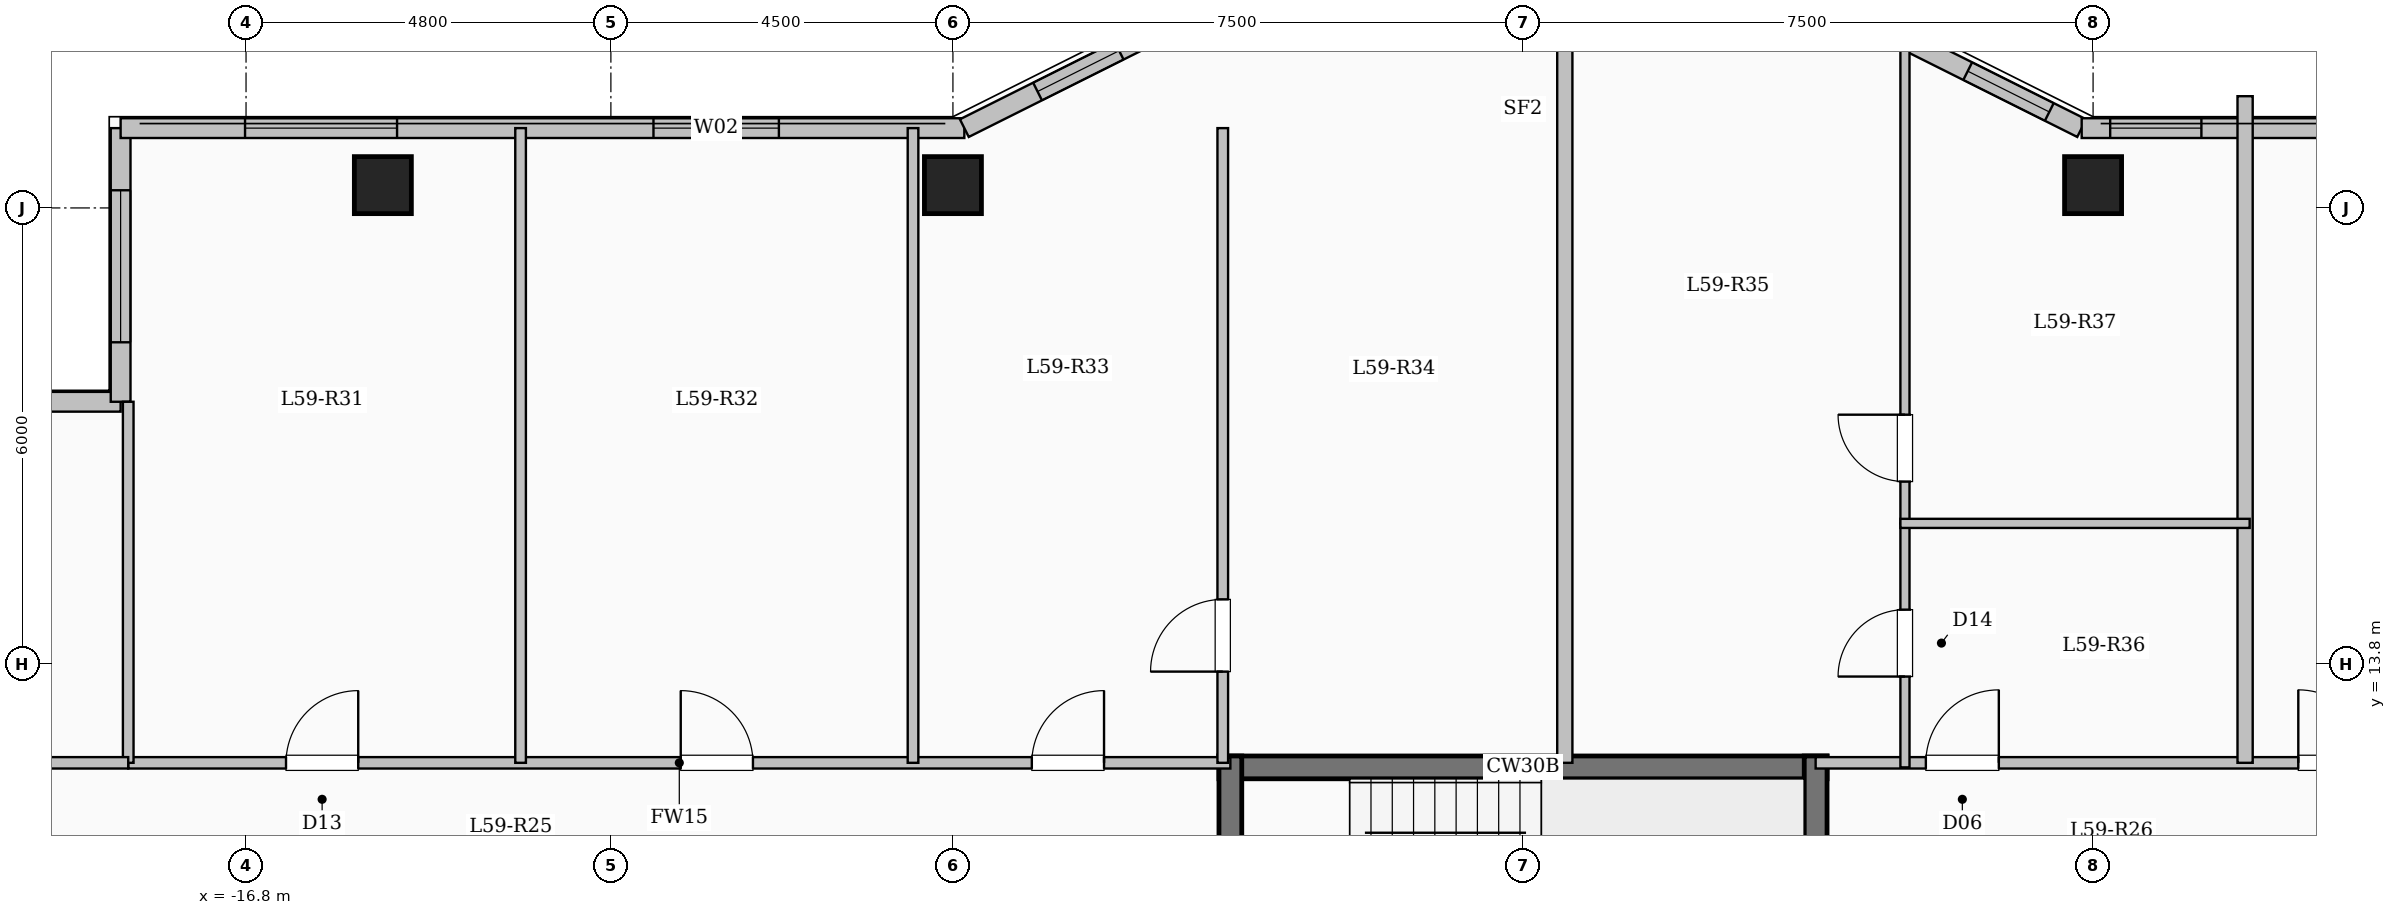
"""IFC4 building model, lengths in metres.
Left out: names, types, materials, properties, quantities, classifications, styles, units other than length and angle.
Written with IfcOpenShell. Run it as: python <this file> out.ifc"""

import sys

from ifc_helpers import new_model, si_unit, direction, frame, frame_2d, origin, origin_2d, place, context, subcontext, project, spatial, rectangle, extrude, element, fill, save


model = new_model("IFC4")
c1 = context("Model", 3, precision=1e-05, world=origin(), true_north=direction((0.0, 1.0)))
c2 = subcontext(c1, "Body", "Model", "MODEL_VIEW")
j1 = project(units=[si_unit("LENGTHUNIT", "METRE"), si_unit("PLANEANGLEUNIT", "RADIAN")], contexts=[c1])
p1 = place(None, origin())
s1 = spatial("IfcSite", under=j1, at=p1, CompositionType="ELEMENT")
p2 = place(p1, origin())
s2 = spatial("IfcBuilding", under=s1, at=p2, CompositionType="ELEMENT")
p3 = place(p2, frame((0.0, 0.0, 217.05)))
s3 = spatial("IfcBuildingStorey", under=s2, at=p3, CompositionType="ELEMENT", Elevation=217.05)
for number, where, z_axis, x_axis in (
    (1, (-15.0, 20.1, 0.0), (0.0, 0.0, 1.0), (1.0, 0.0, 0.0)),
    (2, (-7.5, 20.1, 0.0), (0.0, 0.0, 1.0), (1.0, 0.0, 0.0)),
    (3, (7.5, 20.1, 0.0), (0.0, 0.0, 1.0), (1.0, 0.0, 0.0)),
):
    element("IfcColumn", number, at=place(p3, frame(where, z_axis=z_axis, x_axis=x_axis)), inside=s3, PredefinedType="COLUMN", context=c2, shape_type="SweptSolid", body=[
        extrude(rectangle(XDim=0.75, YDim=0.75, at=origin_2d()), origin(), (0.0, 0.0, 1.0), 3.35),
    ])
p4 = place(p3, frame((-23.55, 17.25, 0.0), z_axis=(0.0, 0.0, 1.0), x_axis=(1.0, 0.0, 0.0)))
e4 = element("IfcWall", 4, at=p4, inside=s3, PredefinedType="SOLIDWALL", context=c2, shape_type="SweptSolid", body=[
    extrude(rectangle(XDim=5.1, YDim=0.26, at=frame_2d((2.55, 0.0))), origin(), (0.0, 0.0, 1.0), 3.1),
])
p5 = place(p4, frame((1.575, 0.0, 0.9)))
e5 = element("IfcOpeningElement", 5, at=p5, cuts=e4, PredefinedType="OPENING", context=c2, shape_type="SweptSolid", body=[
    extrude(rectangle(XDim=2.0, YDim=1.7, at=frame_2d((1.0, 0.85))), frame((0.0, 0.14, 0.0), z_axis=(0.0, -1.0, 0.0), x_axis=(1.0, 0.0, 0.0)), (0.0, 0.0, 1.0), 0.28),
])
p6 = place(p3, frame((-18.45, 17.25, 0.0), z_axis=(0.0, 0.0, 1.0), x_axis=(0.0, 1.0, 0.0)))
e6 = element("IfcWall", 6, at=p6, inside=s3, PredefinedType="SOLIDWALL", context=c2, shape_type="SweptSolid", body=[
    extrude(rectangle(XDim=3.6, YDim=0.26, at=frame_2d((1.8, 0.0))), origin(), (0.0, 0.0, 1.0), 3.1),
])
p7 = place(p6, frame((0.782, 0.0, 0.9)))
e7 = element("IfcOpeningElement", 7, at=p7, cuts=e6, PredefinedType="OPENING", context=c2, shape_type="SweptSolid", body=[
    extrude(rectangle(XDim=2.0, YDim=1.7, at=frame_2d((1.0, 0.85))), frame((0.0, 0.14, 0.0), z_axis=(0.0, -1.0, 0.0), x_axis=(1.0, 0.0, 0.0)), (0.0, 0.0, 1.0), 0.28),
])
p8 = place(p3, frame((-18.45, 20.85, 0.0), z_axis=(0.0, 0.0, 1.0), x_axis=(1.0, 0.0, 0.0)))
e8 = element("IfcWall", 8, at=p8, inside=s3, PredefinedType="SOLIDWALL", context=c2, shape_type="SweptSolid", body=[
    extrude(rectangle(XDim=11.1, YDim=0.26, at=frame_2d((5.55, 0.0))), origin(), (0.0, 0.0, 1.0), 3.1),
])
p9 = place(p8, frame((1.637, 0.0, 0.9)))
e9 = element("IfcOpeningElement", 9, at=p9, cuts=e8, PredefinedType="OPENING", context=c2, shape_type="SweptSolid", body=[
    extrude(rectangle(XDim=2.0, YDim=1.7, at=frame_2d((1.0, 0.85))), frame((0.0, 0.14, 0.0), z_axis=(0.0, -1.0, 0.0), x_axis=(1.0, 0.0, 0.0)), (0.0, 0.0, 1.0), 0.28),
])
p10 = place(p8, frame((7.01, 0.0, 0.9)))
e10 = element("IfcOpeningElement", 10, at=p10, cuts=e8, PredefinedType="OPENING", context=c2, shape_type="SweptSolid", body=[
    extrude(rectangle(XDim=1.65, YDim=1.6, at=frame_2d((0.825, 0.8))), frame((0.0, 0.14, 0.0), z_axis=(0.0, -1.0, 0.0), x_axis=(1.0, 0.0, 0.0)), (0.0, 0.0, 1.0), 0.28),
])
p11 = place(p3, frame((-7.35, 20.85, 0.0), z_axis=(0.0, 0.0, 1.0), x_axis=(0.894427191, 0.4472135955, 0.0)))
e11 = element("IfcWall", 11, at=p11, inside=s3, PredefinedType="SOLIDWALL", context=c2, shape_type="SweptSolid", body=[
    extrude(rectangle(XDim=3.354, YDim=0.26, at=frame_2d((1.677, 0.0))), origin(), (0.0, 0.0, 1.0), 3.1),
])
p12 = place(p11, frame((1.077, 0.0, 0.95)))
e12 = element("IfcOpeningElement", 12, at=p12, cuts=e11, PredefinedType="OPENING", context=c2, shape_type="SweptSolid", body=[
    extrude(rectangle(XDim=1.2, YDim=1.5, at=frame_2d((0.6, 0.75))), frame((0.0, 0.14, 0.0), z_axis=(0.0, -1.0, 0.0), x_axis=(1.0, 0.0, 0.0)), (0.0, 0.0, 1.0), 0.28),
])
p13 = place(p3, frame((4.35, 22.35, 0.0), z_axis=(0.0, 0.0, 1.0), x_axis=(0.894427191, -0.4472135955, 0.0)))
e13 = element("IfcWall", 13, at=p13, inside=s3, PredefinedType="SOLIDWALL", context=c2, shape_type="SweptSolid", body=[
    extrude(rectangle(XDim=3.354, YDim=0.26, at=frame_2d((1.677, 0.0))), origin(), (0.0, 0.0, 1.0), 3.1),
])
p14 = place(p13, frame((1.678, 0.0, 0.95)))
e14 = element("IfcOpeningElement", 14, at=p14, cuts=e13, PredefinedType="OPENING", context=c2, shape_type="SweptSolid", body=[
    extrude(rectangle(XDim=1.2, YDim=1.5, at=frame_2d((0.6, 0.75))), frame((0.0, 0.14, 0.0), z_axis=(0.0, -1.0, 0.0), x_axis=(1.0, 0.0, 0.0)), (0.0, 0.0, 1.0), 0.28),
])
p15 = place(p3, frame((7.35, 20.85, 0.0), z_axis=(0.0, 0.0, 1.0), x_axis=(1.0, 0.0, 0.0)))
e15 = element("IfcWall", 15, at=p15, inside=s3, PredefinedType="SOLIDWALL", context=c2, shape_type="SweptSolid", body=[
    extrude(rectangle(XDim=11.1, YDim=0.26, at=frame_2d((5.55, 0.0))), origin(), (0.0, 0.0, 1.0), 3.1),
])
p16 = place(p15, frame((0.375, 0.0, 0.95)))
e16 = element("IfcOpeningElement", 16, at=p16, cuts=e15, PredefinedType="OPENING", context=c2, shape_type="SweptSolid", body=[
    extrude(rectangle(XDim=1.2, YDim=1.5, at=frame_2d((0.6, 0.75))), frame((0.0, 0.14, 0.0), z_axis=(0.0, -1.0, 0.0), x_axis=(1.0, 0.0, 0.0)), (0.0, 0.0, 1.0), 0.28),
])
p17 = place(p15, frame((3.245, 0.0, 0.9)))
e17 = element("IfcOpeningElement", 17, at=p17, cuts=e15, PredefinedType="OPENING", context=c2, shape_type="SweptSolid", body=[
    extrude(rectangle(XDim=2.2, YDim=1.75, at=frame_2d((1.1, 0.875))), frame((0.0, 0.14, 0.0), z_axis=(0.0, -1.0, 0.0), x_axis=(1.0, 0.0, 0.0)), (0.0, 0.0, 1.0), 0.28),
])
p18 = place(p15, frame((7.965, 0.0, 0.9)))
e18 = element("IfcOpeningElement", 18, at=p18, cuts=e15, PredefinedType="OPENING", context=c2, shape_type="SweptSolid", body=[
    extrude(rectangle(XDim=1.65, YDim=1.6, at=frame_2d((0.825, 0.8))), frame((0.0, 0.14, 0.0), z_axis=(0.0, -1.0, 0.0), x_axis=(1.0, 0.0, 0.0)), (0.0, 0.0, 1.0), 0.28),
])
p19 = place(p3, frame((-4.0, 12.44, 0.0), z_axis=(0.0, 0.0, 1.0), x_axis=(1.0, 0.0, 0.0)))
e19 = element("IfcWall", 19, at=p19, inside=s3, PredefinedType="SHEAR", context=c2, shape_type="SweptSolid", body=[
    extrude(rectangle(XDim=8.0, YDim=0.3, at=frame_2d((4.0, 0.0))), origin(), (0.0, 0.0, 1.0), 3.35),
])
for number, where, z_axis, x_axis in (
    (20, (-3.85, 9.0, 0.0), (0.0, 0.0, 1.0), (0.0, 1.0, 0.0)),
    (21, (3.85, 9.0, 0.0), (0.0, 0.0, 1.0), (0.0, 1.0, 0.0)),
):
    element("IfcWall", number, at=place(p3, frame(where, z_axis=z_axis, x_axis=x_axis)), inside=s3, PredefinedType="SHEAR", context=c2, shape_type="SweptSolid", body=[
        extrude(rectangle(XDim=3.59, YDim=0.3, at=frame_2d((1.795, 0.0))), origin(), (0.0, 0.0, 1.0), 3.35),
    ])
p20 = place(p3, frame((-18.35, 12.5, 0.0), z_axis=(0.0, 0.0, 1.0), x_axis=(1.0, 0.0, 0.0)))
e22 = element("IfcWall", 22, at=p20, inside=s3, PredefinedType="PARTITIONING", context=c2, shape_type="SweptSolid", body=[
    extrude(rectangle(XDim=14.5, YDim=0.15, at=frame_2d((7.25, 0.0))), origin(), (0.0, 0.0, 1.0), 3.1),
])
p21 = place(p20, frame((2.076, 0.0, 0.0)))
e23 = element("IfcOpeningElement", 23, at=p21, cuts=e22, PredefinedType="OPENING", context=c2, shape_type="SweptSolid", body=[
    extrude(rectangle(XDim=0.95, YDim=2.15, at=frame_2d((0.475, 1.075))), frame((0.0, 0.085, 0.0), z_axis=(0.0, -1.0, 0.0), x_axis=(1.0, 0.0, 0.0)), (0.0, 0.0, 1.0), 0.17),
])
p22 = place(p20, frame((7.269, 0.0, 0.0)))
e24 = element("IfcOpeningElement", 24, at=p22, cuts=e22, PredefinedType="OPENING", context=c2, shape_type="SweptSolid", body=[
    extrude(rectangle(XDim=0.95, YDim=2.15, at=frame_2d((0.475, 1.075))), frame((0.0, 0.085, 0.0), z_axis=(0.0, -1.0, 0.0), x_axis=(1.0, 0.0, 0.0)), (0.0, 0.0, 1.0), 0.17),
])
p23 = place(p20, frame((11.888, 0.0, 0.0)))
e25 = element("IfcOpeningElement", 25, at=p23, cuts=e22, PredefinedType="OPENING", context=c2, shape_type="SweptSolid", body=[
    extrude(rectangle(XDim=0.95, YDim=2.15, at=frame_2d((0.475, 1.075))), frame((0.0, 0.085, 0.0), z_axis=(0.0, -1.0, 0.0), x_axis=(1.0, 0.0, 0.0)), (0.0, 0.0, 1.0), 0.17),
])
p24 = place(p3, frame((3.85, 12.5, 0.0), z_axis=(0.0, 0.0, 1.0), x_axis=(1.0, 0.0, 0.0)))
e26 = element("IfcWall", 26, at=p24, inside=s3, PredefinedType="PARTITIONING", context=c2, shape_type="SweptSolid", body=[
    extrude(rectangle(XDim=14.5, YDim=0.15, at=frame_2d((7.25, 0.0))), origin(), (0.0, 0.0, 1.0), 3.1),
])
p25 = place(p24, frame((1.45, 0.0, 0.0)))
e27 = element("IfcOpeningElement", 27, at=p25, cuts=e26, PredefinedType="OPENING", context=c2, shape_type="SweptSolid", body=[
    extrude(rectangle(XDim=0.96, YDim=2.15, at=frame_2d((0.48, 1.075))), frame((0.0, 0.085, 0.0), z_axis=(0.0, -1.0, 0.0), x_axis=(1.0, 0.0, 0.0)), (0.0, 0.0, 1.0), 0.17),
])
p26 = place(p24, frame((6.35, 0.0, 0.0)))
e28 = element("IfcOpeningElement", 28, at=p26, cuts=e26, PredefinedType="OPENING", context=c2, shape_type="SweptSolid", body=[
    extrude(rectangle(XDim=0.96, YDim=2.15, at=frame_2d((0.48, 1.075))), frame((0.0, 0.085, 0.0), z_axis=(0.0, -1.0, 0.0), x_axis=(1.0, 0.0, 0.0)), (0.0, 0.0, 1.0), 0.17),
])
p27 = place(p3, frame((0.55, 12.5, 0.0), z_axis=(0.0, 0.0, 1.0), x_axis=(0.0, 1.0, 0.0)))
e29 = element("IfcWall", 29, at=p27, inside=s3, PredefinedType="SOLIDWALL", context=c2, shape_type="SweptSolid", body=[
    extrude(rectangle(XDim=9.88, YDim=0.2, at=frame_2d((4.94, 0.0))), origin(), (0.0, 0.0, 1.0), 3.1),
])
p28 = place(p3, frame((-3.95, 12.5, 0.0), z_axis=(0.0, 0.0, 1.0), x_axis=(0.0, 1.0, 0.0)))
e30 = element("IfcWall", 30, at=p28, inside=s3, PredefinedType="PARTITIONING", context=c2, shape_type="SweptSolid", body=[
    extrude(rectangle(XDim=8.35, YDim=0.14, at=frame_2d((4.175, 0.0))), origin(), (0.0, 0.0, 1.0), 3.1),
])
p29 = place(p28, frame((1.2, 0.0, 0.0)))
e31 = element("IfcOpeningElement", 31, at=p29, cuts=e30, PredefinedType="OPENING", context=c2, shape_type="SweptSolid", body=[
    extrude(rectangle(XDim=0.95, YDim=2.15, at=frame_2d((0.475, 1.075))), frame((0.0, 0.08, 0.0), z_axis=(0.0, -1.0, 0.0), x_axis=(1.0, 0.0, 0.0)), (0.0, 0.0, 1.0), 0.16),
])
p30 = place(p3, frame((-13.188, 12.5, 0.0), z_axis=(0.0, 0.0, 1.0), x_axis=(0.0, 1.0, 0.0)))
e32 = element("IfcWall", 32, at=p30, inside=s3, PredefinedType="PARTITIONING", context=c2, shape_type="SweptSolid", body=[
    extrude(rectangle(XDim=8.35, YDim=0.14, at=frame_2d((4.175, 0.0))), origin(), (0.0, 0.0, 1.0), 3.1),
])
p31 = place(p3, frame((-8.025, 12.5, 0.0), z_axis=(0.0, 0.0, 1.0), x_axis=(0.0, 1.0, 0.0)))
e33 = element("IfcWall", 33, at=p31, inside=s3, PredefinedType="PARTITIONING", context=c2, shape_type="SweptSolid", body=[
    extrude(rectangle(XDim=8.35, YDim=0.14, at=frame_2d((4.175, 0.0))), origin(), (0.0, 0.0, 1.0), 2.585),
])
p32 = place(p3, frame((9.5, 12.5, 0.0), z_axis=(0.0, 0.0, 1.0), x_axis=(0.0, 1.0, 0.0)))
e34 = element("IfcWall", 34, at=p32, inside=s3, PredefinedType="SOLIDWALL", context=c2, shape_type="SweptSolid", body=[
    extrude(rectangle(XDim=8.77, YDim=0.2, at=frame_2d((4.385, 0.0))), origin(), (0.0, 0.0, 1.0), 3.1),
])
p33 = place(p3, frame((5.025, 12.44, 0.0), z_axis=(0.0, 0.0, 1.0), x_axis=(0.0, 1.0, 0.0)))
e35 = element("IfcWall", 35, at=p33, inside=s3, PredefinedType="PARTITIONING", context=c2, shape_type="SweptSolid", body=[
    extrude(rectangle(XDim=3.21, YDim=0.12, at=frame_2d((1.605, 0.0))), origin(), (0.0, 0.0, 1.0), 3.1),
])
p34 = place(p33, frame((1.195, 0.0, 0.0)))
e36 = element("IfcOpeningElement", 36, at=p34, cuts=e35, PredefinedType="OPENING", context=c2, shape_type="SweptSolid", body=[
    extrude(rectangle(XDim=0.88, YDim=2.1, at=frame_2d((0.44, 1.05))), frame((0.0, 0.07, 0.0), z_axis=(0.0, -1.0, 0.0), x_axis=(1.0, 0.0, 0.0)), (0.0, 0.0, 1.0), 0.14),
])
p35 = place(p3, frame((5.025, 15.65, 0.0), z_axis=(0.0, 0.0, 1.0), x_axis=(0.0, 1.0, 0.0)))
e37 = element("IfcWall", 37, at=p35, inside=s3, PredefinedType="PARTITIONING", context=c2, shape_type="SweptSolid", body=[
    extrude(rectangle(XDim=6.724, YDim=0.12, at=frame_2d((3.362, 0.0))), origin(), (0.0, 0.0, 1.0), 3.1),
])
p36 = place(p35, frame((0.55, 0.0, 0.0)))
e38 = element("IfcOpeningElement", 38, at=p36, cuts=e37, PredefinedType="OPENING", context=c2, shape_type="SweptSolid", body=[
    extrude(rectangle(XDim=0.88, YDim=2.1, at=frame_2d((0.44, 1.05))), frame((0.0, 0.07, 0.0), z_axis=(0.0, -1.0, 0.0), x_axis=(1.0, 0.0, 0.0)), (0.0, 0.0, 1.0), 0.14),
])
p37 = place(p3, frame((4.965, 15.65, 0.0), z_axis=(0.0, 0.0, 1.0), x_axis=(1.0, 0.0, 0.0)))
e39 = element("IfcWall", 39, at=p37, inside=s3, PredefinedType="PARTITIONING", context=c2, shape_type="SweptSolid", body=[
    extrude(rectangle(XDim=4.595, YDim=0.12, at=frame_2d((2.297, 0.0))), origin(), (0.0, 0.0, 1.0), 2.725),
])
p38 = place(p3, frame((-18.35, 12.5, 0.0), z_axis=(0.0, 0.0, 1.0), x_axis=(0.0, 1.0, 0.0)))
e40 = element("IfcWall", 40, at=p38, inside=s3, PredefinedType="PARTITIONING", context=c2, shape_type="SweptSolid", body=[
    extrude(rectangle(XDim=4.75, YDim=0.14, at=frame_2d((2.375, 0.0))), origin(), (0.0, 0.0, 1.0), 3.1),
])
p39 = place(p3, frame((-23.58, 12.5, 0.0), z_axis=(0.0, 0.0, 1.0), x_axis=(1.0, 0.0, 0.0)))
e41 = element("IfcWall", 41, at=p39, inside=s3, PredefinedType="PARTITIONING", context=c2, shape_type="SweptSolid", body=[
    extrude(rectangle(XDim=5.23, YDim=0.15, at=frame_2d((2.615, 0.0))), origin(), (0.0, 0.0, 1.0), 3.1),
])
p40 = place(p39, frame((2.14, 0.0, 0.0)))
e42 = element("IfcOpeningElement", 42, at=p40, cuts=e41, PredefinedType="OPENING", context=c2, shape_type="SweptSolid", body=[
    extrude(rectangle(XDim=0.95, YDim=2.15, at=frame_2d((0.475, 1.075))), frame((0.0, 0.085, 0.0), z_axis=(0.0, -1.0, 0.0), x_axis=(1.0, 0.0, 0.0)), (0.0, 0.0, 1.0), 0.17),
])
p41 = place(p7, origin())
e43 = element("IfcWindow", 43, at=p41, inside=s3, PartitioningType="SINGLE_PANEL", PredefinedType="WINDOW", context=c2, shape_type="SweptSolid", body=[
    extrude(rectangle(XDim=2.0, YDim=1.7, at=frame_2d((1.0, 0.85))), frame((0.0, 0.03, 0.0), z_axis=(0.0, -1.0, 0.0), x_axis=(1.0, 0.0, 0.0)), (0.0, 0.0, 1.0), 0.06),
])
fill(e7, e43)
p42 = place(p9, origin())
e44 = element("IfcWindow", 44, at=p42, inside=s3, PartitioningType="SINGLE_PANEL", PredefinedType="WINDOW", context=c2, shape_type="SweptSolid", body=[
    extrude(rectangle(XDim=2.0, YDim=1.7, at=frame_2d((1.0, 0.85))), frame((0.0, 0.03, 0.0), z_axis=(0.0, -1.0, 0.0), x_axis=(1.0, 0.0, 0.0)), (0.0, 0.0, 1.0), 0.06),
])
fill(e9, e44)
p43 = place(p10, origin())
e45 = element("IfcWindow", 45, at=p43, inside=s3, PartitioningType="SINGLE_PANEL", PredefinedType="WINDOW", context=c2, shape_type="SweptSolid", body=[
    extrude(rectangle(XDim=1.65, YDim=1.6, at=frame_2d((0.825, 0.8))), frame((0.0, 0.03, 0.0), z_axis=(0.0, -1.0, 0.0), x_axis=(1.0, 0.0, 0.0)), (0.0, 0.0, 1.0), 0.06),
])
fill(e10, e45)
p44 = place(p12, origin())
e46 = element("IfcWindow", 46, at=p44, inside=s3, PartitioningType="SINGLE_PANEL", PredefinedType="WINDOW", context=c2, shape_type="SweptSolid", body=[
    extrude(rectangle(XDim=1.2, YDim=1.5, at=frame_2d((0.6, 0.75))), frame((0.0, 0.03, 0.0), z_axis=(0.0, -1.0, 0.0), x_axis=(1.0, 0.0, 0.0)), (0.0, 0.0, 1.0), 0.06),
])
fill(e12, e46)
p45 = place(p14, origin())
e47 = element("IfcWindow", 47, at=p45, inside=s3, PartitioningType="SINGLE_PANEL", PredefinedType="WINDOW", context=c2, shape_type="SweptSolid", body=[
    extrude(rectangle(XDim=1.2, YDim=1.5, at=frame_2d((0.6, 0.75))), frame((0.0, 0.03, 0.0), z_axis=(0.0, -1.0, 0.0), x_axis=(1.0, 0.0, 0.0)), (0.0, 0.0, 1.0), 0.06),
])
fill(e14, e47)
p46 = place(p16, origin())
e48 = element("IfcWindow", 48, at=p46, inside=s3, PartitioningType="SINGLE_PANEL", PredefinedType="WINDOW", context=c2, shape_type="SweptSolid", body=[
    extrude(rectangle(XDim=1.2, YDim=1.5, at=frame_2d((0.6, 0.75))), frame((0.0, 0.03, 0.0), z_axis=(0.0, -1.0, 0.0), x_axis=(1.0, 0.0, 0.0)), (0.0, 0.0, 1.0), 0.06),
])
fill(e16, e48)
p47 = place(p21, origin())
e49 = element("IfcDoor", 49, at=p47, inside=s3, OperationType="SINGLE_SWING_RIGHT", PredefinedType="DOOR", context=c2, shape_type="SweptSolid", body=[
    extrude(rectangle(XDim=0.95, YDim=2.15, at=frame_2d((0.475, 1.075))), frame((0.0, 0.025, 0.0), z_axis=(0.0, -1.0, 0.0), x_axis=(1.0, 0.0, 0.0)), (0.0, 0.0, 1.0), 0.05),
])
fill(e23, e49)
p48 = place(p22, origin())
e50 = element("IfcDoor", 50, at=p48, inside=s3, OperationType="SINGLE_SWING_LEFT", PredefinedType="DOOR", context=c2, shape_type="SweptSolid", body=[
    extrude(rectangle(XDim=0.95, YDim=2.15, at=frame_2d((0.475, 1.075))), frame((0.0, 0.025, 0.0), z_axis=(0.0, -1.0, 0.0), x_axis=(1.0, 0.0, 0.0)), (0.0, 0.0, 1.0), 0.05),
])
fill(e24, e50)
p49 = place(p23, origin())
e51 = element("IfcDoor", 51, at=p49, inside=s3, OperationType="SINGLE_SWING_RIGHT", PredefinedType="DOOR", context=c2, shape_type="SweptSolid", body=[
    extrude(rectangle(XDim=0.95, YDim=2.15, at=frame_2d((0.475, 1.075))), frame((0.0, 0.025, 0.0), z_axis=(0.0, -1.0, 0.0), x_axis=(1.0, 0.0, 0.0)), (0.0, 0.0, 1.0), 0.05),
])
fill(e25, e51)
p50 = place(p29, origin())
e52 = element("IfcDoor", 52, at=p50, inside=s3, OperationType="SINGLE_SWING_LEFT", PredefinedType="DOOR", context=c2, shape_type="SweptSolid", body=[
    extrude(rectangle(XDim=0.95, YDim=2.15, at=frame_2d((0.475, 1.075))), frame((0.0, 0.025, 0.0), z_axis=(0.0, -1.0, 0.0), x_axis=(1.0, 0.0, 0.0)), (0.0, 0.0, 1.0), 0.05),
])
fill(e31, e52)
p51 = place(p25, origin())
e53 = element("IfcDoor", 53, at=p51, inside=s3, OperationType="SINGLE_SWING_RIGHT", PredefinedType="DOOR", context=c2, shape_type="SweptSolid", body=[
    extrude(rectangle(XDim=0.96, YDim=2.15, at=frame_2d((0.48, 1.075))), frame((0.0, 0.025, 0.0), z_axis=(0.0, -1.0, 0.0), x_axis=(1.0, 0.0, 0.0)), (0.0, 0.0, 1.0), 0.05),
])
fill(e27, e53)
p52 = place(p34, origin())
e54 = element("IfcDoor", 54, at=p52, inside=s3, OperationType="SINGLE_SWING_LEFT", PredefinedType="DOOR", context=c2, shape_type="SweptSolid", body=[
    extrude(rectangle(XDim=0.88, YDim=2.1, at=frame_2d((0.44, 1.05))), frame((0.0, 0.025, 0.0), z_axis=(0.0, -1.0, 0.0), x_axis=(1.0, 0.0, 0.0)), (0.0, 0.0, 1.0), 0.05),
])
fill(e36, e54)
p53 = place(p36, origin())
e55 = element("IfcDoor", 55, at=p53, inside=s3, OperationType="SINGLE_SWING_RIGHT", PredefinedType="DOOR", context=c2, shape_type="SweptSolid", body=[
    extrude(rectangle(XDim=0.88, YDim=2.1, at=frame_2d((0.44, 1.05))), frame((0.0, 0.025, 0.0), z_axis=(0.0, -1.0, 0.0), x_axis=(1.0, 0.0, 0.0)), (0.0, 0.0, 1.0), 0.05),
])
fill(e38, e55)
p54 = place(p26, origin())
e56 = element("IfcDoor", 56, at=p54, inside=s3, OperationType="SINGLE_SWING_LEFT", PredefinedType="DOOR", context=c2, shape_type="SweptSolid", body=[
    extrude(rectangle(XDim=0.96, YDim=2.15, at=frame_2d((0.48, 1.075))), frame((0.0, 0.025, 0.0), z_axis=(0.0, -1.0, 0.0), x_axis=(1.0, 0.0, 0.0)), (0.0, 0.0, 1.0), 0.05),
])
fill(e28, e56)
save(model, sys.argv[1])
